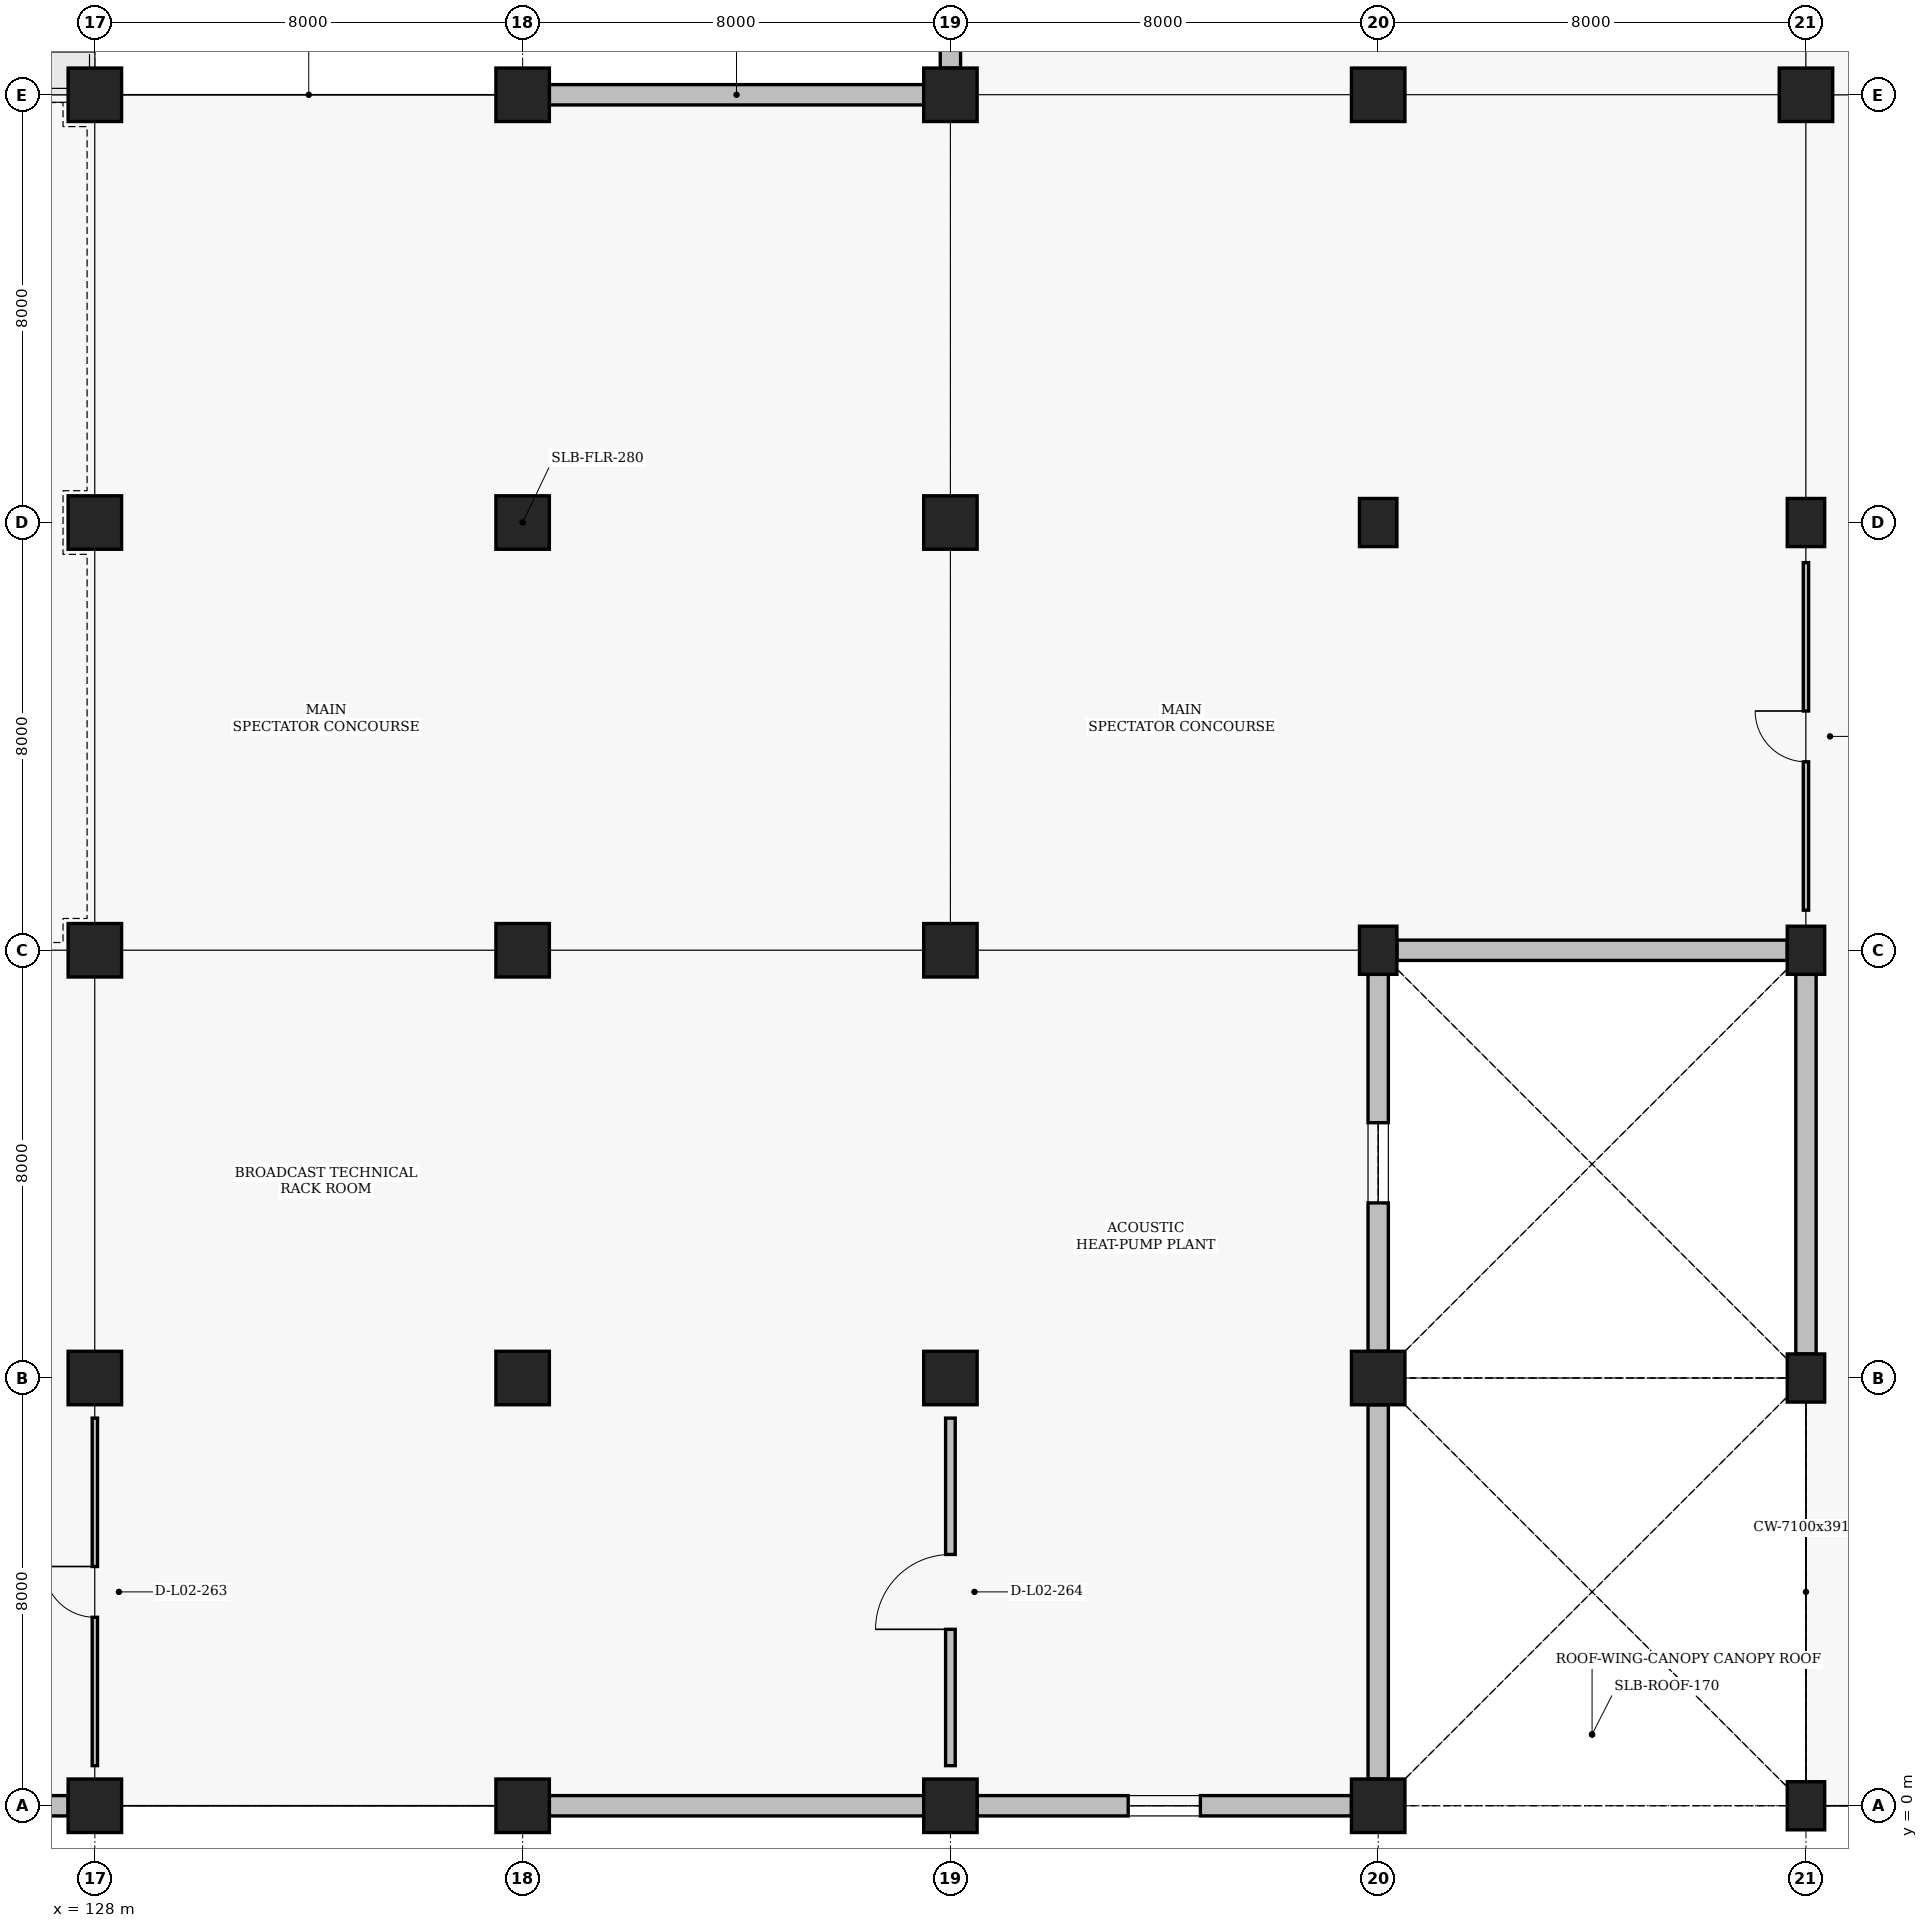
"""IFC4 building model, lengths in metres.
Left out: names, types, materials, properties, quantities, classifications, styles, units other than length and angle.
Written with IfcOpenShell. Run it as: python <this file> out.ifc"""

import sys

from ifc_helpers import new_model, si_unit, direction, frame, frame_2d, origin, origin_2d, place, context, subcontext, project, spatial, rectangle, extrude, element, fill, save


model = new_model("IFC4")
c1 = context("Model", 3, precision=1e-05, world=origin(), true_north=direction((0.0, 1.0)))
c2 = subcontext(c1, "Body", "Model", "MODEL_VIEW")
j1 = project(units=[si_unit("LENGTHUNIT", "METRE"), si_unit("PLANEANGLEUNIT", "RADIAN")], contexts=[c1])
p1 = place(None, origin())
s1 = spatial("IfcSite", under=j1, at=p1, CompositionType="ELEMENT")
p2 = place(p1, origin())
s2 = spatial("IfcBuilding", under=s1, at=p2, CompositionType="ELEMENT")
p3 = place(p2, frame((0.0, 0.0, 4.8)))
s3 = spatial("IfcBuildingStorey", under=s2, at=p3, CompositionType="ELEMENT", Elevation=4.8)
for number, where, z_axis, x_axis in (
    (1, (128.0, 0.0, 0.0), (0.0, 0.0, 1.0), (1.0, 0.0, 0.0)),
    (2, (128.0, 8.0, 0.0), (0.0, 0.0, 1.0), (1.0, 0.0, 0.0)),
    (3, (128.0, 16.0, 0.0), (0.0, 0.0, 1.0), (1.0, 0.0, 0.0)),
    (4, (128.0, 24.0, 0.0), (0.0, 0.0, 1.0), (1.0, 0.0, 0.0)),
    (5, (128.0, 32.0, 0.0), (0.0, 0.0, 1.0), (1.0, 0.0, 0.0)),
    (6, (136.0, 0.0, 0.0), (0.0, 0.0, 1.0), (1.0, 0.0, 0.0)),
    (7, (136.0, 8.0, 0.0), (0.0, 0.0, 1.0), (1.0, 0.0, 0.0)),
    (8, (136.0, 16.0, 0.0), (0.0, 0.0, 1.0), (1.0, 0.0, 0.0)),
    (9, (136.0, 24.0, 0.0), (0.0, 0.0, 1.0), (1.0, 0.0, 0.0)),
    (10, (136.0, 32.0, 0.0), (0.0, 0.0, 1.0), (1.0, 0.0, 0.0)),
    (11, (144.0, 0.0, 0.0), (0.0, 0.0, 1.0), (1.0, 0.0, 0.0)),
    (12, (144.0, 8.0, 0.0), (0.0, 0.0, 1.0), (1.0, 0.0, 0.0)),
    (13, (144.0, 16.0, 0.0), (0.0, 0.0, 1.0), (1.0, 0.0, 0.0)),
    (14, (144.0, 24.0, 0.0), (0.0, 0.0, 1.0), (1.0, 0.0, 0.0)),
    (15, (144.0, 32.0, 0.0), (0.0, 0.0, 1.0), (1.0, 0.0, 0.0)),
    (16, (152.0, 0.0, 0.0), (0.0, 0.0, 1.0), (1.0, 0.0, 0.0)),
    (17, (152.0, 8.0, 0.0), (0.0, 0.0, 1.0), (1.0, 0.0, 0.0)),
):
    element("IfcColumn", number, at=place(p3, frame(where, z_axis=z_axis, x_axis=x_axis)), inside=s3, PredefinedType="COLUMN", context=c2, shape_type="SweptSolid", body=[
        extrude(rectangle(XDim=1.0, YDim=1.0, at=origin_2d()), origin(), (0.0, 0.0, 1.0), 4.8),
    ])
for number, where, z_axis, x_axis in (
    (18, (152.0, 16.0, 0.0), (0.0, 0.0, 1.0), (1.0, 0.0, 0.0)),
    (19, (152.0, 24.0, 0.0), (0.0, 0.0, 1.0), (1.0, 0.0, 0.0)),
):
    element("IfcColumn", number, at=place(p3, frame(where, z_axis=z_axis, x_axis=x_axis)), inside=s3, PredefinedType="COLUMN", context=c2, shape_type="SweptSolid", body=[
        extrude(rectangle(XDim=0.7, YDim=0.9, at=origin_2d()), origin(), (0.0, 0.0, 1.0), 4.8),
    ])
p4 = place(p3, frame((152.0, 32.0, 0.0), z_axis=(0.0, 0.0, 1.0), x_axis=(1.0, 0.0, 0.0)))
e20 = element("IfcColumn", 20, at=p4, inside=s3, PredefinedType="COLUMN", context=c2, shape_type="SweptSolid", body=[
    extrude(rectangle(XDim=1.0, YDim=1.0, at=origin_2d()), origin(), (0.0, 0.0, 1.0), 4.8),
])
for number, where, z_axis, x_axis in (
    (21, (160.0, 0.0, 0.0), (0.0, 0.0, 1.0), (1.0, 0.0, 0.0)),
    (22, (160.0, 8.0, 0.0), (0.0, 0.0, 1.0), (1.0, 0.0, 0.0)),
    (23, (160.0, 16.0, 0.0), (0.0, 0.0, 1.0), (1.0, 0.0, 0.0)),
    (24, (160.0, 24.0, 0.0), (0.0, 0.0, 1.0), (1.0, 0.0, 0.0)),
):
    element("IfcColumn", number, at=place(p3, frame(where, z_axis=z_axis, x_axis=x_axis)), inside=s3, PredefinedType="COLUMN", context=c2, shape_type="SweptSolid", body=[
        extrude(rectangle(XDim=0.7, YDim=0.9, at=origin_2d()), origin(), (0.0, 0.0, 1.0), 4.8),
    ])
p5 = place(p3, frame((160.0, 32.0, 0.0), z_axis=(0.0, 0.0, 1.0), x_axis=(1.0, 0.0, 0.0)))
e25 = element("IfcColumn", 25, at=p5, inside=s3, PredefinedType="COLUMN", context=c2, shape_type="SweptSolid", body=[
    extrude(rectangle(XDim=1.0, YDim=1.0, at=origin_2d()), origin(), (0.0, 0.0, 1.0), 4.8),
])
for number, where, z_axis, x_axis in (
    (26, (120.5, 0.0, 0.0), (0.0, 0.0, 1.0), (1.0, 0.0, 0.0)),
    (27, (136.5, 0.0, 0.0), (0.0, 0.0, 1.0), (1.0, 0.0, 0.0)),
):
    element("IfcWall", number, at=place(p3, frame(where, z_axis=z_axis, x_axis=x_axis)), inside=s3, PredefinedType="SOLIDWALL", context=c2, shape_type="SweptSolid", body=[
        extrude(rectangle(XDim=7.0, YDim=0.38, at=frame_2d((3.5, 0.0))), origin(), (0.0, 0.0, 1.0), 3.95),
    ])
p6 = place(p3, frame((136.5, 32.0, 0.0), z_axis=(0.0, 0.0, 1.0), x_axis=(1.0, 0.0, 0.0)))
e28 = element("IfcWall", 28, at=p6, inside=s3, PredefinedType="SOLIDWALL", context=c2, shape_type="SweptSolid", body=[
    extrude(rectangle(XDim=7.0, YDim=0.38, at=frame_2d((3.5, 0.0))), origin(), (0.0, 0.0, 1.0), 3.91),
])
p7 = place(p3, frame((144.5, 0.0, 0.0), z_axis=(0.0, 0.0, 1.0), x_axis=(1.0, 0.0, 0.0)))
e29 = element("IfcWall", 29, at=p7, inside=s3, PredefinedType="SOLIDWALL", context=c2, shape_type="SweptSolid", body=[
    extrude(rectangle(XDim=7.0, YDim=0.38, at=frame_2d((3.5, 0.0))), origin(), (0.0, 0.0, 1.0), 3.95),
])
p8 = place(p7, frame((2.825, 0.0, 0.95)))
e30 = element("IfcOpeningElement", 30, at=p8, cuts=e29, PredefinedType="OPENING", context=c2, shape_type="SweptSolid", body=[
    extrude(rectangle(XDim=1.35, YDim=1.6, at=frame_2d((0.675, 0.8))), frame((0.0, 0.2, 0.0), z_axis=(0.0, -1.0, 0.0), x_axis=(1.0, 0.0, 0.0)), (0.0, 0.0, 1.0), 0.4),
])
p9 = place(p3, frame((152.0, 0.5, 0.0), z_axis=(0.0, 0.0, 1.0), x_axis=(0.0, 1.0, 0.0)))
e31 = element("IfcWall", 31, at=p9, inside=s3, PredefinedType="SOLIDWALL", context=c2, shape_type="SweptSolid", body=[
    extrude(rectangle(XDim=7.0, YDim=0.38, at=frame_2d((3.5, 0.0))), origin(), (0.0, 0.0, 1.0), 3.95),
])
p10 = place(p3, frame((152.0, 8.5, 0.0), z_axis=(0.0, 0.0, 1.0), x_axis=(0.0, 1.0, 0.0)))
e32 = element("IfcWall", 32, at=p10, inside=s3, PredefinedType="SOLIDWALL", context=c2, shape_type="SweptSolid", body=[
    extrude(rectangle(XDim=7.05, YDim=0.38, at=frame_2d((3.525, 0.0))), origin(), (0.0, 0.0, 1.0), 3.95),
])
p11 = place(p10, frame((2.775, 0.0, 0.95)))
e33 = element("IfcOpeningElement", 33, at=p11, cuts=e32, PredefinedType="OPENING", context=c2, shape_type="SweptSolid", body=[
    extrude(rectangle(XDim=1.5, YDim=1.6, at=frame_2d((0.75, 0.8))), frame((0.0, 0.2, 0.0), z_axis=(0.0, -1.0, 0.0), x_axis=(1.0, 0.0, 0.0)), (0.0, 0.0, 1.0), 0.4),
])
p12 = place(p3, frame((144.0, 32.5, 0.0), z_axis=(0.0, 0.0, 1.0), x_axis=(0.0, 1.0, 0.0)))
e34 = element("IfcWall", 34, at=p12, inside=s3, PredefinedType="SOLIDWALL", context=c2, shape_type="SweptSolid", body=[
    extrude(rectangle(XDim=7.0, YDim=0.38, at=frame_2d((3.5, 0.0))), origin(), (0.0, 0.0, 1.0), 3.91),
])
p13 = place(p12, frame((2.675, 0.0, 0.95)))
e35 = element("IfcOpeningElement", 35, at=p13, cuts=e34, PredefinedType="OPENING", context=c2, shape_type="SweptSolid", body=[
    extrude(rectangle(XDim=1.65, YDim=1.7, at=frame_2d((0.825, 0.85))), frame((0.0, 0.2, 0.0), z_axis=(0.0, -1.0, 0.0), x_axis=(1.0, 0.0, 0.0)), (0.0, 0.0, 1.0), 0.4),
])
p14 = place(p3, frame((152.35, 16.0, 0.0), z_axis=(0.0, 0.0, 1.0), x_axis=(1.0, 0.0, 0.0)))
e36 = element("IfcWall", 36, at=p14, inside=s3, PredefinedType="SOLIDWALL", context=c2, shape_type="SweptSolid", body=[
    extrude(rectangle(XDim=7.3, YDim=0.38, at=frame_2d((3.65, 0.0))), origin(), (0.0, 0.0, 1.0), 3.91),
])
p15 = place(p3, frame((160.0, 8.45, 0.0), z_axis=(0.0, 0.0, 1.0), x_axis=(0.0, 1.0, 0.0)))
e37 = element("IfcWall", 37, at=p15, inside=s3, PredefinedType="SOLIDWALL", context=c2, shape_type="SweptSolid", body=[
    extrude(rectangle(XDim=7.1, YDim=0.38, at=frame_2d((3.55, 0.0))), origin(), (0.0, 0.0, 1.0), 3.91),
])
p16 = place(p3, frame((160.0, 16.75, 0.0), z_axis=(0.0, 0.0, 1.0), x_axis=(0.0, 1.0, 0.0)))
e38 = element("IfcWall", 38, at=p16, inside=s3, PredefinedType="PARTITIONING", context=c2, shape_type="SweptSolid", body=[
    extrude(rectangle(XDim=6.5, YDim=0.1, at=frame_2d((3.25, 0.0))), origin(), (0.0, 0.0, 1.0), 3.91),
])
p17 = place(p16, frame((2.775, 0.0, 0.0)))
e39 = element("IfcOpeningElement", 39, at=p17, cuts=e38, PredefinedType="OPENING", context=c2, shape_type="SweptSolid", body=[
    extrude(rectangle(XDim=0.95, YDim=2.1, at=frame_2d((0.475, 1.05))), frame((0.0, 0.06, 0.0), z_axis=(0.0, -1.0, 0.0), x_axis=(1.0, 0.0, 0.0)), (0.0, 0.0, 1.0), 0.12),
])
p18 = place(p3, frame((128.0, 0.75, 0.0), z_axis=(0.0, 0.0, 1.0), x_axis=(0.0, 1.0, 0.0)))
e40 = element("IfcWall", 40, at=p18, inside=s3, PredefinedType="PARTITIONING", context=c2, shape_type="SweptSolid", body=[
    extrude(rectangle(XDim=6.5, YDim=0.1, at=frame_2d((3.25, 0.0))), origin(), (0.0, 0.0, 1.0), 3.97),
])
p19 = place(p18, frame((2.775, 0.0, 0.0)))
e41 = element("IfcOpeningElement", 41, at=p19, cuts=e40, PredefinedType="OPENING", context=c2, shape_type="SweptSolid", body=[
    extrude(rectangle(XDim=0.95, YDim=2.1, at=frame_2d((0.475, 1.05))), frame((0.0, 0.06, 0.0), z_axis=(0.0, -1.0, 0.0), x_axis=(1.0, 0.0, 0.0)), (0.0, 0.0, 1.0), 0.12),
])
p20 = place(p3, frame((144.0, 0.75, 0.0), z_axis=(0.0, 0.0, 1.0), x_axis=(0.0, 1.0, 0.0)))
e42 = element("IfcWall", 42, at=p20, inside=s3, PredefinedType="PARTITIONING", context=c2, shape_type="SweptSolid", body=[
    extrude(rectangle(XDim=6.5, YDim=0.18, at=frame_2d((3.25, 0.0))), origin(), (0.0, 0.0, 1.0), 3.97),
])
p21 = place(p20, frame((2.55, 0.0, 0.0)))
e43 = element("IfcOpeningElement", 43, at=p21, cuts=e42, PredefinedType="OPENING", context=c2, shape_type="SweptSolid", body=[
    extrude(rectangle(XDim=1.4, YDim=2.2, at=frame_2d((0.7, 1.1))), frame((0.0, 0.1, 0.0), z_axis=(0.0, -1.0, 0.0), x_axis=(1.0, 0.0, 0.0)), (0.0, 0.0, 1.0), 0.2),
])
p22 = place(p8, origin())
e44 = element("IfcWindow", 44, at=p22, inside=s3, PartitioningType="SINGLE_PANEL", PredefinedType="WINDOW", context=c2, shape_type="SweptSolid", body=[
    extrude(rectangle(XDim=1.35, YDim=1.6, at=frame_2d((0.675, 0.8))), frame((0.0, 0.03, 0.0), z_axis=(0.0, -1.0, 0.0), x_axis=(1.0, 0.0, 0.0)), (0.0, 0.0, 1.0), 0.06),
])
fill(e30, e44)
p23 = place(p11, origin())
e45 = element("IfcWindow", 45, at=p23, inside=s3, PartitioningType="SINGLE_PANEL", PredefinedType="WINDOW", context=c2, shape_type="SweptSolid", body=[
    extrude(rectangle(XDim=1.5, YDim=1.6, at=frame_2d((0.75, 0.8))), frame((0.0, 0.03, 0.0), z_axis=(0.0, -1.0, 0.0), x_axis=(1.0, 0.0, 0.0)), (0.0, 0.0, 1.0), 0.06),
])
fill(e33, e45)
p24 = place(p17, origin())
e46 = element("IfcDoor", 46, at=p24, inside=s3, OperationType="SINGLE_SWING_RIGHT", PredefinedType="DOOR", context=c2, shape_type="SweptSolid", body=[
    extrude(rectangle(XDim=0.95, YDim=2.1, at=frame_2d((0.475, 1.05))), frame((0.0, 0.025, 0.0), z_axis=(0.0, -1.0, 0.0), x_axis=(1.0, 0.0, 0.0)), (0.0, 0.0, 1.0), 0.05),
])
fill(e39, e46)
p25 = place(p19, origin())
e47 = element("IfcDoor", 47, at=p25, inside=s3, OperationType="SINGLE_SWING_RIGHT", PredefinedType="DOOR", context=c2, shape_type="SweptSolid", body=[
    extrude(rectangle(XDim=0.95, YDim=2.1, at=frame_2d((0.475, 1.05))), frame((0.0, 0.025, 0.0), z_axis=(0.0, -1.0, 0.0), x_axis=(1.0, 0.0, 0.0)), (0.0, 0.0, 1.0), 0.05),
])
fill(e41, e47)
p26 = place(p21, origin())
e48 = element("IfcDoor", 48, at=p26, inside=s3, OperationType="SINGLE_SWING_LEFT", PredefinedType="DOOR", context=c2, shape_type="SweptSolid", body=[
    extrude(rectangle(XDim=1.4, YDim=2.2, at=frame_2d((0.7, 1.1))), frame((0.0, 0.025, 0.0), z_axis=(0.0, -1.0, 0.0), x_axis=(1.0, 0.0, 0.0)), (0.0, 0.0, 1.0), 0.05),
])
fill(e43, e48)
save(model, sys.argv[1])
